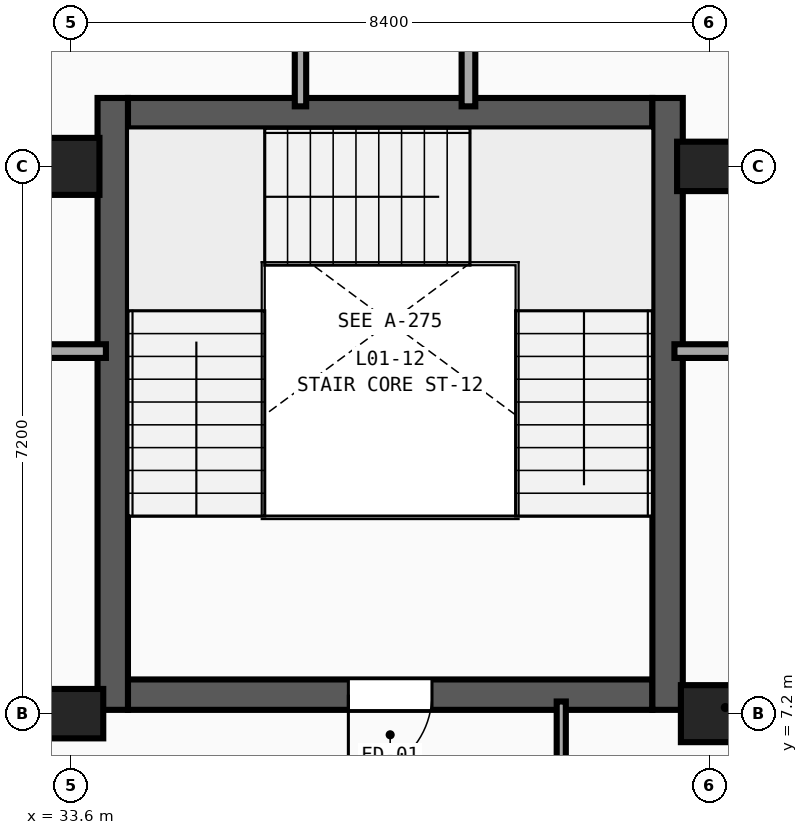
"""IFC4 building model, lengths in metres.
Left out: names, types, materials, properties, quantities, classifications, styles, units other than length and angle.
Written with IfcOpenShell. Run it as: python <this file> out.ifc"""

import sys

from ifc_helpers import new_model, si_unit, direction, frame, frame_2d, origin, origin_2d, place, context, subcontext, project, spatial, rectangle, extrude, element, fill, save


model = new_model("IFC4")
c1 = context("Model", 3, precision=1e-05, world=origin(), true_north=direction((0.0, 1.0)))
c2 = subcontext(c1, "Body", "Model", "MODEL_VIEW")
j1 = project(units=[si_unit("LENGTHUNIT", "METRE"), si_unit("PLANEANGLEUNIT", "RADIAN")], contexts=[c1])
p1 = place(None, origin())
s1 = spatial("IfcSite", under=j1, at=p1, CompositionType="ELEMENT")
p2 = place(p1, origin())
s2 = spatial("IfcBuilding", under=s1, at=p2, CompositionType="ELEMENT")
p3 = place(p2, frame((0.0, 0.0, 5.4)))
s3 = spatial("IfcBuildingStorey", under=s2, at=p3, CompositionType="ELEMENT", Elevation=5.4)
p4 = place(p3, frame((33.6, 7.2, 0.0), z_axis=(0.0, 0.0, 1.0), x_axis=(1.0, 0.0, 0.0)))
e1 = element("IfcColumn", 1, at=p4, inside=s3, PredefinedType="COLUMN", context=c2, shape_type="SweptSolid", body=[
    extrude(rectangle(XDim=0.85, YDim=0.65, at=origin_2d()), origin(), (0.0, 0.0, 1.0), 4.5),
])
for number, where, z_axis, x_axis in (
    (2, (33.6, 14.4, 0.0), (0.0, 0.0, 1.0), (1.0, 0.0, 0.0)),
    (3, (42.0, 7.2, 0.0), (0.0, 0.0, 1.0), (1.0, 0.0, 0.0)),
):
    element("IfcColumn", number, at=place(p3, frame(where, z_axis=z_axis, x_axis=x_axis)), inside=s3, PredefinedType="COLUMN", context=c2, shape_type="SweptSolid", body=[
        extrude(rectangle(XDim=0.75, YDim=0.75, at=origin_2d()), origin(), (0.0, 0.0, 1.0), 4.5),
    ])
p5 = place(p3, frame((42.0, 14.4, 0.0), z_axis=(0.0, 0.0, 1.0), x_axis=(1.0, 0.0, 0.0)))
e4 = element("IfcColumn", 4, at=p5, inside=s3, PredefinedType="COLUMN", context=c2, shape_type="SweptSolid", body=[
    extrude(rectangle(XDim=0.85, YDim=0.65, at=origin_2d()), origin(), (0.0, 0.0, 1.0), 4.5),
])
p6 = place(p3, frame((41.25, 7.45, 0.0), z_axis=(0.0, 0.0, 1.0), x_axis=(-1.0, 0.0, 0.0)))
e5 = element("IfcWall", 5, at=p6, inside=s3, PredefinedType="SHEAR", context=c2, shape_type="SweptSolid", body=[
    extrude(rectangle(XDim=6.9, YDim=0.4, at=frame_2d((3.45, 0.0))), origin(), (0.0, 0.0, 1.0), 4.5),
])
p7 = place(p6, frame((2.9, 0.0, 0.0)))
e6 = element("IfcOpeningElement", 6, at=p7, cuts=e5, PredefinedType="OPENING", context=c2, shape_type="SweptSolid", body=[
    extrude(rectangle(XDim=1.1, YDim=2.2, at=frame_2d((0.55, 1.1))), frame((0.0, 0.22, 0.0), z_axis=(0.0, -1.0, 0.0), x_axis=(1.0, 0.0, 0.0)), (0.0, 0.0, 1.0), 0.44),
])
p8 = place(p3, frame((34.35, 15.1, 0.0), z_axis=(0.0, 0.0, 1.0), x_axis=(1.0, 0.0, 0.0)))
e7 = element("IfcWall", 7, at=p8, inside=s3, PredefinedType="SHEAR", context=c2, shape_type="SweptSolid", body=[
    extrude(rectangle(XDim=6.9, YDim=0.4, at=frame_2d((3.45, 0.0))), origin(), (0.0, 0.0, 1.0), 4.5),
])
for number, where, z_axis, x_axis in (
    (8, (34.15, 15.3, 0.0), (0.0, 0.0, 1.0), (0.0, -1.0, 0.0)),
    (9, (41.45, 7.25, 0.0), (0.0, 0.0, 1.0), (0.0, 1.0, 0.0)),
):
    element("IfcWall", number, at=place(p3, frame(where, z_axis=z_axis, x_axis=x_axis)), inside=s3, PredefinedType="SHEAR", context=c2, shape_type="SweptSolid", body=[
        extrude(rectangle(XDim=8.05, YDim=0.4, at=frame_2d((4.025, 0.0))), origin(), (0.0, 0.0, 1.0), 4.5),
    ])
p9 = place(p3, frame((41.54, 11.97, 0.0), z_axis=(0.0, 0.0, 1.0), x_axis=(1.0, 0.0, 0.0)))
e10 = element("IfcWall", 10, at=p9, inside=s3, PredefinedType="PARTITIONING", context=c2, shape_type="SweptSolid", body=[
    extrude(rectangle(XDim=15.64, YDim=0.18, at=frame_2d((7.82, 0.0))), origin(), (0.0, 0.0, 1.0), 4.18),
])
p10 = place(p9, frame((5.93, 0.0, 0.0)))
e11 = element("IfcOpeningElement", 11, at=p10, cuts=e10, PredefinedType="OPENING", context=c2, shape_type="SweptSolid", body=[
    extrude(rectangle(XDim=1.52, YDim=2.05, at=frame_2d((0.76, 1.025))), frame((0.0, 0.11, 0.0), z_axis=(0.0, -1.0, 0.0), x_axis=(1.0, 0.0, 0.0)), (0.0, 0.0, 1.0), 0.22),
])
p11 = place(p3, frame((22.24, 11.97, 0.0), z_axis=(0.0, 0.0, 1.0), x_axis=(1.0, 0.0, 0.0)))
e12 = element("IfcWall", 12, at=p11, inside=s3, PredefinedType="PARTITIONING", context=c2, shape_type="SweptSolid", body=[
    extrude(rectangle(XDim=11.82, YDim=0.18, at=frame_2d((5.91, 0.0))), origin(), (0.0, 0.0, 1.0), 4.18),
])
p12 = place(p11, frame((5.15, 0.0, 0.0)))
e13 = element("IfcOpeningElement", 13, at=p12, cuts=e12, PredefinedType="OPENING", context=c2, shape_type="SweptSolid", body=[
    extrude(rectangle(XDim=1.52, YDim=2.45, at=frame_2d((0.76, 1.225))), frame((0.0, 0.11, 0.0), z_axis=(0.0, -1.0, 0.0), x_axis=(1.0, 0.0, 0.0)), (0.0, 0.0, 1.0), 0.22),
])
p13 = place(p3, frame((38.83, 15.19, 0.0), z_axis=(0.0, 0.0, 1.0), x_axis=(0.0, 1.0, 0.0)))
e14 = element("IfcWall", 14, at=p13, inside=s3, PredefinedType="PARTITIONING", context=c2, shape_type="SweptSolid", body=[
    extrude(rectangle(XDim=3.43, YDim=0.18, at=frame_2d((1.715, 0.0))), origin(), (0.0, 0.0, 1.0), 4.18),
])
p14 = place(p13, frame((1.26, 0.0, 0.0)))
e15 = element("IfcOpeningElement", 15, at=p14, cuts=e14, PredefinedType="OPENING", context=c2, shape_type="SweptSolid", body=[
    extrude(rectangle(XDim=1.52, YDim=2.21, at=frame_2d((0.76, 1.105))), frame((0.0, 0.11, 0.0), z_axis=(0.0, -1.0, 0.0), x_axis=(1.0, 0.0, 0.0)), (0.0, 0.0, 1.0), 0.22),
])
p15 = place(p3, frame((36.62, 15.19, 0.0), z_axis=(0.0, 0.0, 1.0), x_axis=(0.0, 1.0, 0.0)))
e16 = element("IfcWall", 16, at=p15, inside=s3, PredefinedType="PARTITIONING", context=c2, shape_type="SweptSolid", body=[
    extrude(rectangle(XDim=3.27, YDim=0.15, at=frame_2d((1.635, 0.0))), origin(), (0.0, 0.0, 1.0), 4.18),
])
p16 = place(p15, frame((1.201, 0.0, 0.0)))
e17 = element("IfcOpeningElement", 17, at=p16, cuts=e16, PredefinedType="OPENING", context=c2, shape_type="SweptSolid", body=[
    extrude(rectangle(XDim=1.2, YDim=2.29, at=frame_2d((0.6, 1.145))), frame((0.0, 0.095, 0.0), z_axis=(0.0, -1.0, 0.0), x_axis=(1.0, 0.0, 0.0)), (0.0, 0.0, 1.0), 0.19),
])
p17 = place(p3, frame((40.051, 0.37, 0.0), z_axis=(0.0, 0.0, 1.0), x_axis=(0.0, 1.0, 0.0)))
e18 = element("IfcWall", 18, at=p17, inside=s3, PredefinedType="PARTITIONING", context=c2, shape_type="SweptSolid", body=[
    extrude(rectangle(XDim=6.99, YDim=0.12, at=frame_2d((3.495, 0.0))), origin(), (0.0, 0.0, 1.0), 4.18),
])
p18 = place(p7, origin())
e19 = element("IfcDoor", 19, at=p18, inside=s3, OperationType="SINGLE_SWING_RIGHT", PredefinedType="DOOR", context=c2, shape_type="SweptSolid", body=[
    extrude(rectangle(XDim=1.1, YDim=2.2, at=frame_2d((0.55, 1.1))), frame((0.0, 0.025, 0.0), z_axis=(0.0, -1.0, 0.0), x_axis=(1.0, 0.0, 0.0)), (0.0, 0.0, 1.0), 0.05),
])
fill(e6, e19)
save(model, sys.argv[1])
